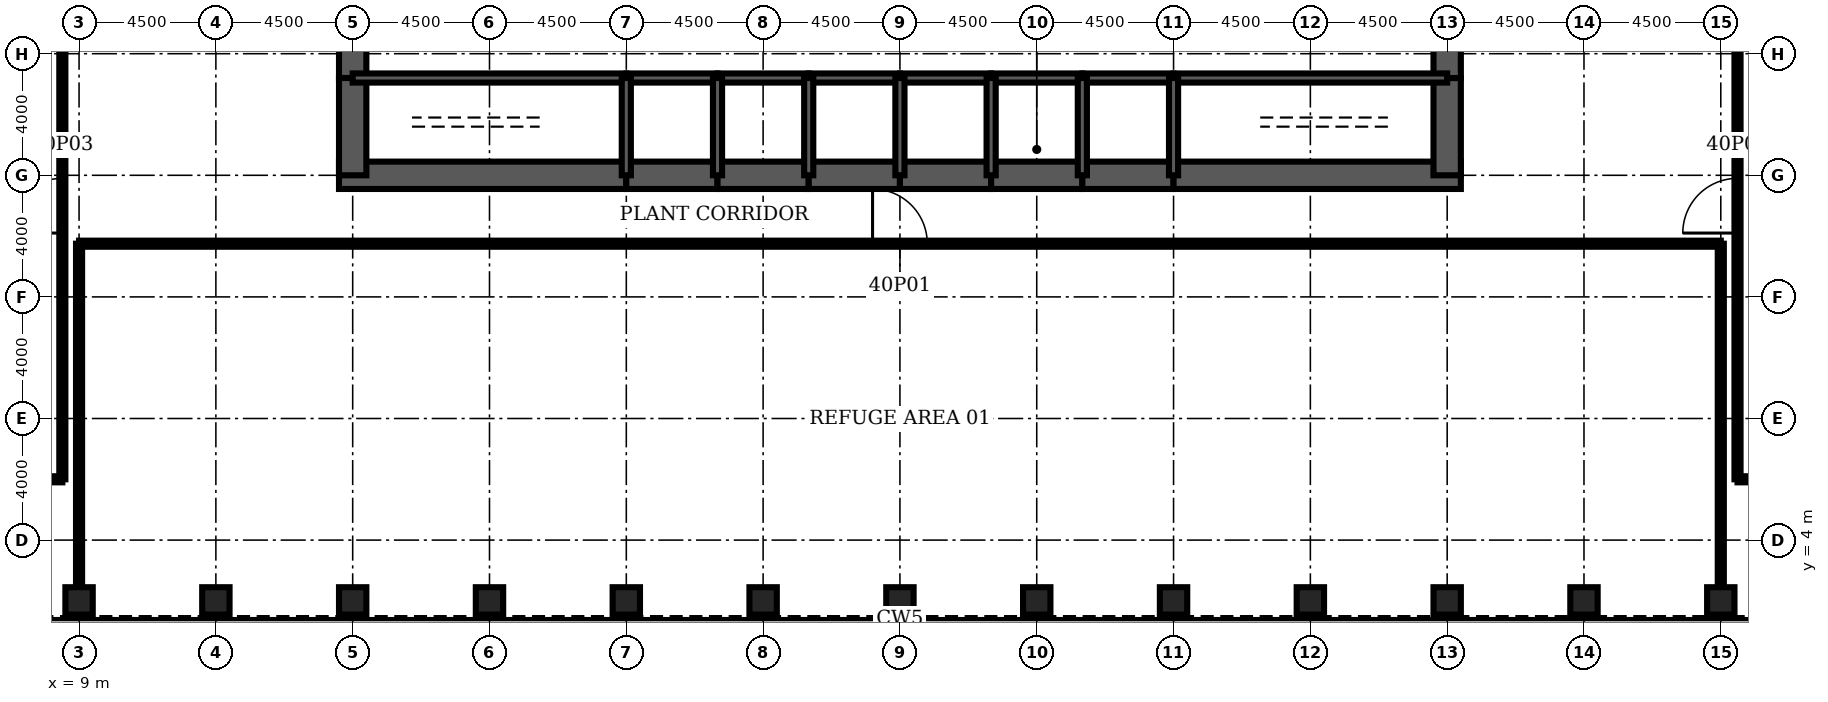
"""IFC4 building model, lengths in metres.
Left out: names, types, materials, properties, quantities, classifications, styles, units other than length and angle.
Written with IfcOpenShell. Run it as: python <this file> out.ifc"""

import sys

from ifc_helpers import new_model, si_unit, direction, frame, frame_2d, origin, origin_2d, place, context, subcontext, project, spatial, rectangle, hollow_rectangle, extrude, element, fill, save


model = new_model("IFC4")
c1 = context("Model", 3, precision=1e-05, world=origin(), true_north=direction((0.0, 1.0)))
c2 = subcontext(c1, "Body", "Model", "MODEL_VIEW")
j1 = project(units=[si_unit("LENGTHUNIT", "METRE"), si_unit("PLANEANGLEUNIT", "RADIAN")], contexts=[c1])
p1 = place(None, origin())
s1 = spatial("IfcSite", under=j1, at=p1, CompositionType="ELEMENT")
p2 = place(p1, origin())
s2 = spatial("IfcBuilding", under=s1, at=p2, CompositionType="ELEMENT")
p3 = place(p2, frame((0.0, 0.0, 180.3)))
s3 = spatial("IfcBuildingStorey", under=s2, at=p3, CompositionType="ELEMENT", Elevation=180.3)
for number, where, z_axis, x_axis in (
    (1, (9.0, 2.0, 0.0), (0.0, 0.0, 1.0), (0.0, 1.0, 0.0)),
    (2, (13.5, 2.0, 0.0), (0.0, 0.0, 1.0), (0.0, 1.0, 0.0)),
    (3, (18.0, 2.0, 0.0), (0.0, 0.0, 1.0), (0.0, 1.0, 0.0)),
    (4, (22.5, 2.0, 0.0), (0.0, 0.0, 1.0), (0.0, 1.0, 0.0)),
    (5, (27.0, 2.0, 0.0), (0.0, 0.0, 1.0), (0.0, 1.0, 0.0)),
    (6, (31.5, 2.0, 0.0), (0.0, 0.0, 1.0), (0.0, 1.0, 0.0)),
    (7, (36.0, 2.0, 0.0), (0.0, 0.0, 1.0), (0.0, 1.0, 0.0)),
    (8, (40.5, 2.0, 0.0), (0.0, 0.0, 1.0), (0.0, 1.0, 0.0)),
    (9, (45.0, 2.0, 0.0), (0.0, 0.0, 1.0), (0.0, 1.0, 0.0)),
    (10, (49.5, 2.0, 0.0), (0.0, 0.0, 1.0), (0.0, 1.0, 0.0)),
    (11, (54.0, 2.0, 0.0), (0.0, 0.0, 1.0), (0.0, 1.0, 0.0)),
    (12, (58.5, 2.0, 0.0), (0.0, 0.0, 1.0), (0.0, 1.0, 0.0)),
    (13, (63.0, 2.0, 0.0), (0.0, 0.0, 1.0), (0.0, 1.0, 0.0)),
):
    element("IfcColumn", number, at=place(p3, frame(where, z_axis=z_axis, x_axis=x_axis)), inside=s3, PredefinedType="COLUMN", context=c2, shape_type="SweptSolid", body=[
        extrude(hollow_rectangle(XDim=0.9, YDim=0.9, WallThickness=0.09, at=origin_2d()), origin(), (0.0, 0.0, 1.0), 5.5),
    ])
p4 = place(p3, frame((17.55, 16.0, 0.0), z_axis=(0.0, 0.0, 1.0), x_axis=(1.0, 0.0, 0.0)))
e14 = element("IfcWall", 14, at=p4, inside=s3, PredefinedType="SHEAR", context=c2, shape_type="SweptSolid", body=[
    extrude(rectangle(XDim=9.45, YDim=0.9, at=frame_2d((4.725, 0.0))), origin(), (0.0, 0.0, 1.0), 5.5),
])
for number, where, z_axis, x_axis in (
    (15, (27.0, 16.0, 0.0), (0.0, 0.0, 1.0), (1.0, 0.0, 0.0)),
    (16, (30.0, 16.0, 0.0), (0.0, 0.0, 1.0), (1.0, 0.0, 0.0)),
    (17, (33.0, 16.0, 0.0), (0.0, 0.0, 1.0), (1.0, 0.0, 0.0)),
    (18, (36.0, 16.0, 0.0), (0.0, 0.0, 1.0), (1.0, 0.0, 0.0)),
    (19, (39.0, 16.0, 0.0), (0.0, 0.0, 1.0), (1.0, 0.0, 0.0)),
    (20, (42.0, 16.0, 0.0), (0.0, 0.0, 1.0), (1.0, 0.0, 0.0)),
):
    element("IfcWall", number, at=place(p3, frame(where, z_axis=z_axis, x_axis=x_axis)), inside=s3, PredefinedType="SHEAR", context=c2, shape_type="SweptSolid", body=[
        extrude(rectangle(XDim=3.0, YDim=0.9, at=frame_2d((1.5, 0.0))), origin(), (0.0, 0.0, 1.0), 5.5),
    ])
p5 = place(p3, frame((45.0, 16.0, 0.0), z_axis=(0.0, 0.0, 1.0), x_axis=(1.0, 0.0, 0.0)))
e21 = element("IfcWall", 21, at=p5, inside=s3, PredefinedType="SHEAR", context=c2, shape_type="SweptSolid", body=[
    extrude(rectangle(XDim=9.45, YDim=0.9, at=frame_2d((4.725, 0.0))), origin(), (0.0, 0.0, 1.0), 5.5),
])
p6 = place(p3, frame((18.0, 22.0, 0.0), z_axis=(0.0, 0.0, 1.0), x_axis=(0.0, -1.0, 0.0)))
e22 = element("IfcWall", 22, at=p6, inside=s3, PredefinedType="SHEAR", context=c2, shape_type="SweptSolid", body=[
    extrude(rectangle(XDim=2.8, YDim=0.9, at=frame_2d((1.4, 0.0))), origin(), (0.0, 0.0, 1.0), 5.5),
])
p7 = place(p6, frame((0.6, 0.0, 0.0)))
e23 = element("IfcOpeningElement", 23, at=p7, cuts=e22, PredefinedType="OPENING", context=c2, shape_type="SweptSolid", body=[
    extrude(rectangle(XDim=1.8, YDim=2.1, at=frame_2d((0.9, 1.05))), frame((0.0, 0.46, 0.0), z_axis=(0.0, -1.0, 0.0), x_axis=(1.0, 0.0, 0.0)), (0.0, 0.0, 1.0), 0.92),
])
for number, where, z_axis, x_axis in (
    (24, (18.0, 19.2, 0.0), (0.0, 0.0, 1.0), (0.0, -1.0, 0.0)),
    (25, (54.0, 16.0, 0.0), (0.0, 0.0, 1.0), (0.0, 1.0, 0.0)),
):
    element("IfcWall", number, at=place(p3, frame(where, z_axis=z_axis, x_axis=x_axis)), inside=s3, PredefinedType="SHEAR", context=c2, shape_type="SweptSolid", body=[
        extrude(rectangle(XDim=3.2, YDim=0.9, at=frame_2d((1.6, 0.0))), origin(), (0.0, 0.0, 1.0), 5.5),
    ])
p8 = place(p3, frame((54.0, 19.2, 0.0), z_axis=(0.0, 0.0, 1.0), x_axis=(0.0, 1.0, 0.0)))
e26 = element("IfcWall", 26, at=p8, inside=s3, PredefinedType="SHEAR", context=c2, shape_type="SweptSolid", body=[
    extrude(rectangle(XDim=2.8, YDim=0.9, at=frame_2d((1.4, 0.0))), origin(), (0.0, 0.0, 1.0), 5.5),
])
p9 = place(p8, frame((0.4, 0.0, 0.0)))
e27 = element("IfcOpeningElement", 27, at=p9, cuts=e26, PredefinedType="OPENING", context=c2, shape_type="SweptSolid", body=[
    extrude(rectangle(XDim=1.8, YDim=2.1, at=frame_2d((0.9, 1.05))), frame((0.0, 0.46, 0.0), z_axis=(0.0, -1.0, 0.0), x_axis=(1.0, 0.0, 0.0)), (0.0, 0.0, 1.0), 0.92),
])
p10 = place(p3, frame((18.0, 19.2, 0.0), z_axis=(0.0, 0.0, 1.0), x_axis=(1.0, 0.0, 0.0)))
e28 = element("IfcWall", 28, at=p10, inside=s3, PredefinedType="SOLIDWALL", context=c2, shape_type="SweptSolid", body=[
    extrude(rectangle(XDim=9.0, YDim=0.3, at=frame_2d((4.5, 0.0))), origin(), (0.0, 0.0, 1.0), 5.5),
])
p11 = place(p10, frame((0.65, 0.0, 0.0)))
e29 = element("IfcOpeningElement", 29, at=p11, cuts=e28, PredefinedType="OPENING", context=c2, shape_type="SweptSolid", body=[
    extrude(rectangle(XDim=1.0, YDim=2.1, at=frame_2d((0.5, 1.05))), frame((0.0, 0.16, 0.0), z_axis=(0.0, -1.0, 0.0), x_axis=(1.0, 0.0, 0.0)), (0.0, 0.0, 1.0), 0.32),
])
p12 = place(p3, frame((27.0, 19.2, 0.0), z_axis=(0.0, 0.0, 1.0), x_axis=(1.0, 0.0, 0.0)))
e30 = element("IfcWall", 30, at=p12, inside=s3, PredefinedType="SOLIDWALL", context=c2, shape_type="SweptSolid", body=[
    extrude(rectangle(XDim=3.0, YDim=0.3, at=frame_2d((1.5, 0.0))), origin(), (0.0, 0.0, 1.0), 5.5),
])
p13 = place(p12, frame((0.95, 0.0, 0.0)))
e31 = element("IfcOpeningElement", 31, at=p13, cuts=e30, PredefinedType="OPENING", context=c2, shape_type="SweptSolid", body=[
    extrude(rectangle(XDim=1.1, YDim=2.2, at=frame_2d((0.55, 1.1))), frame((0.0, 0.16, 0.0), z_axis=(0.0, -1.0, 0.0), x_axis=(1.0, 0.0, 0.0)), (0.0, 0.0, 1.0), 0.32),
])
for number, where, z_axis, x_axis in (
    (32, (30.0, 19.2, 0.0), (0.0, 0.0, 1.0), (1.0, 0.0, 0.0)),
    (33, (33.0, 19.2, 0.0), (0.0, 0.0, 1.0), (1.0, 0.0, 0.0)),
    (34, (36.0, 19.2, 0.0), (0.0, 0.0, 1.0), (1.0, 0.0, 0.0)),
):
    element("IfcWall", number, at=place(p3, frame(where, z_axis=z_axis, x_axis=x_axis)), inside=s3, PredefinedType="SOLIDWALL", context=c2, shape_type="SweptSolid", body=[
        extrude(rectangle(XDim=3.0, YDim=0.3, at=frame_2d((1.5, 0.0))), origin(), (0.0, 0.0, 1.0), 5.5),
    ])
p14 = place(p3, frame((39.0, 19.2, 0.0), z_axis=(0.0, 0.0, 1.0), x_axis=(1.0, 0.0, 0.0)))
e35 = element("IfcWall", 35, at=p14, inside=s3, PredefinedType="SOLIDWALL", context=c2, shape_type="SweptSolid", body=[
    extrude(rectangle(XDim=3.0, YDim=0.3, at=frame_2d((1.5, 0.0))), origin(), (0.0, 0.0, 1.0), 5.5),
])
p15 = place(p14, frame((1.0, 0.0, 0.0)))
e36 = element("IfcOpeningElement", 36, at=p15, cuts=e35, PredefinedType="OPENING", context=c2, shape_type="SweptSolid", body=[
    extrude(rectangle(XDim=1.0, YDim=2.1, at=frame_2d((0.5, 1.05))), frame((0.0, 0.16, 0.0), z_axis=(0.0, -1.0, 0.0), x_axis=(1.0, 0.0, 0.0)), (0.0, 0.0, 1.0), 0.32),
])
p16 = place(p3, frame((42.0, 19.2, 0.0), z_axis=(0.0, 0.0, 1.0), x_axis=(1.0, 0.0, 0.0)))
e37 = element("IfcWall", 37, at=p16, inside=s3, PredefinedType="SOLIDWALL", context=c2, shape_type="SweptSolid", body=[
    extrude(rectangle(XDim=3.0, YDim=0.3, at=frame_2d((1.5, 0.0))), origin(), (0.0, 0.0, 1.0), 5.5),
])
p17 = place(p3, frame((45.0, 19.2, 0.0), z_axis=(0.0, 0.0, 1.0), x_axis=(1.0, 0.0, 0.0)))
e38 = element("IfcWall", 38, at=p17, inside=s3, PredefinedType="SOLIDWALL", context=c2, shape_type="SweptSolid", body=[
    extrude(rectangle(XDim=9.0, YDim=0.3, at=frame_2d((4.5, 0.0))), origin(), (0.0, 0.0, 1.0), 5.5),
])
p18 = place(p17, frame((7.35, 0.0, 0.0)))
e39 = element("IfcOpeningElement", 39, at=p18, cuts=e38, PredefinedType="OPENING", context=c2, shape_type="SweptSolid", body=[
    extrude(rectangle(XDim=1.0, YDim=2.1, at=frame_2d((0.5, 1.05))), frame((0.0, 0.16, 0.0), z_axis=(0.0, -1.0, 0.0), x_axis=(1.0, 0.0, 0.0)), (0.0, 0.0, 1.0), 0.32),
])
for number, where, z_axis, x_axis in (
    (40, (27.0, 16.0, 0.0), (0.0, 0.0, 1.0), (0.0, 1.0, 0.0)),
    (41, (30.0, 16.0, 0.0), (0.0, 0.0, 1.0), (0.0, 1.0, 0.0)),
    (42, (33.0, 16.0, 0.0), (0.0, 0.0, 1.0), (0.0, 1.0, 0.0)),
    (43, (36.0, 16.0, 0.0), (0.0, 0.0, 1.0), (0.0, 1.0, 0.0)),
    (44, (39.0, 16.0, 0.0), (0.0, 0.0, 1.0), (0.0, 1.0, 0.0)),
    (45, (42.0, 16.0, 0.0), (0.0, 0.0, 1.0), (0.0, 1.0, 0.0)),
    (46, (45.0, 16.0, 0.0), (0.0, 0.0, 1.0), (0.0, 1.0, 0.0)),
):
    element("IfcWall", number, at=place(p3, frame(where, z_axis=z_axis, x_axis=x_axis)), inside=s3, PredefinedType="SOLIDWALL", context=c2, shape_type="SweptSolid", body=[
        extrude(rectangle(XDim=3.2, YDim=0.3, at=frame_2d((1.6, 0.0))), origin(), (0.0, 0.0, 1.0), 5.5),
    ])
p19 = place(p3, frame((39.15, 17.4, 0.0), z_axis=(0.0, 0.0, 1.0), x_axis=(1.0, 0.0, 0.0)))
e47 = element("IfcWall", 47, at=p19, inside=s3, PredefinedType="SOLIDWALL", context=c2, shape_type="SweptSolid", body=[
    extrude(rectangle(XDim=2.7, YDim=0.3, at=frame_2d((1.35, 0.0))), origin(), (0.0, 0.0, 1.0), 5.34),
])
p20 = place(p19, frame((0.85, 0.0, 0.0)))
e48 = element("IfcOpeningElement", 48, at=p20, cuts=e47, PredefinedType="OPENING", context=c2, shape_type="SweptSolid", body=[
    extrude(rectangle(XDim=1.0, YDim=2.1, at=frame_2d((0.5, 1.05))), frame((0.0, 0.16, 0.0), z_axis=(0.0, -1.0, 0.0), x_axis=(1.0, 0.0, 0.0)), (0.0, 0.0, 1.0), 0.32),
])
for number, where, z_axis, x_axis in (
    (49, (2.7, 6.0, 0.0), (0.0, 0.0, 1.0), (1.0, 0.0, 0.0)),
    (50, (63.55, 6.0, 0.0), (0.0, 0.0, 1.0), (1.0, 0.0, 0.0)),
):
    element("IfcWall", number, at=place(p3, frame(where, z_axis=z_axis, x_axis=x_axis)), inside=s3, PredefinedType="PARTITIONING", context=c2, shape_type="SweptSolid", body=[
        extrude(rectangle(XDim=5.75, YDim=0.2, at=frame_2d((2.875, 0.0))), origin(), (0.0, 0.0, 1.0), 5.34),
    ])
p21 = place(p3, frame((9.0, 13.75, 0.0), z_axis=(0.0, 0.0, 1.0), x_axis=(1.0, 0.0, 0.0)))
e51 = element("IfcWall", 51, at=p21, inside=s3, PredefinedType="PARTITIONING", context=c2, shape_type="SweptSolid", body=[
    extrude(rectangle(XDim=54.0, YDim=0.2, at=frame_2d((27.0, 0.0))), origin(), (0.0, 0.0, 1.0), 5.34),
])
p22 = place(p21, frame((26.1, 0.0, 0.0)))
e52 = element("IfcOpeningElement", 52, at=p22, cuts=e51, PredefinedType="OPENING", context=c2, shape_type="SweptSolid", body=[
    extrude(rectangle(XDim=1.8, YDim=2.1, at=frame_2d((0.9, 1.05))), frame((0.0, 0.11, 0.0), z_axis=(0.0, -1.0, 0.0), x_axis=(1.0, 0.0, 0.0)), (0.0, 0.0, 1.0), 0.22),
])
p23 = place(p3, frame((8.45, 6.0, 0.0), z_axis=(0.0, 0.0, 1.0), x_axis=(0.0, 1.0, 0.0)))
e53 = element("IfcWall", 53, at=p23, inside=s3, PredefinedType="PARTITIONING", context=c2, shape_type="SweptSolid", body=[
    extrude(rectangle(XDim=36.0, YDim=0.2, at=frame_2d((18.0, 0.0))), origin(), (0.0, 0.0, 1.0), 5.34),
])
p24 = place(p23, frame((8.1, 0.0, 0.0)))
e54 = element("IfcOpeningElement", 54, at=p24, cuts=e53, PredefinedType="OPENING", context=c2, shape_type="SweptSolid", body=[
    extrude(rectangle(XDim=1.8, YDim=2.1, at=frame_2d((0.9, 1.05))), frame((0.0, 0.11, 0.0), z_axis=(0.0, -1.0, 0.0), x_axis=(1.0, 0.0, 0.0)), (0.0, 0.0, 1.0), 0.22),
])
p25 = place(p23, frame((23.1, 0.0, 0.0)))
e55 = element("IfcOpeningElement", 55, at=p25, cuts=e53, PredefinedType="OPENING", context=c2, shape_type="SweptSolid", body=[
    extrude(rectangle(XDim=1.8, YDim=2.1, at=frame_2d((0.9, 1.05))), frame((0.0, 0.11, 0.0), z_axis=(0.0, -1.0, 0.0), x_axis=(1.0, 0.0, 0.0)), (0.0, 0.0, 1.0), 0.22),
])
p26 = place(p23, frame((32.5, 0.0, 0.0)))
e56 = element("IfcOpeningElement", 56, at=p26, cuts=e53, PredefinedType="OPENING", context=c2, shape_type="SweptSolid", body=[
    extrude(rectangle(XDim=1.0, YDim=2.1, at=frame_2d((0.5, 1.05))), frame((0.0, 0.11, 0.0), z_axis=(0.0, -1.0, 0.0), x_axis=(1.0, 0.0, 0.0)), (0.0, 0.0, 1.0), 0.22),
])
for number, where, z_axis, x_axis in (
    (57, (9.0, 2.45, 0.0), (0.0, 0.0, 1.0), (0.0, 1.0, 0.0)),
    (58, (63.0, 2.45, 0.0), (0.0, 0.0, 1.0), (0.0, 1.0, 0.0)),
):
    element("IfcWall", number, at=place(p3, frame(where, z_axis=z_axis, x_axis=x_axis)), inside=s3, PredefinedType="PARTITIONING", context=c2, shape_type="SweptSolid", body=[
        extrude(rectangle(XDim=11.3, YDim=0.2, at=frame_2d((5.65, 0.0))), origin(), (0.0, 0.0, 1.0), 5.34),
    ])
p27 = place(p3, frame((63.55, 6.0, 0.0), z_axis=(0.0, 0.0, 1.0), x_axis=(0.0, 1.0, 0.0)))
e59 = element("IfcWall", 59, at=p27, inside=s3, PredefinedType="PARTITIONING", context=c2, shape_type="SweptSolid", body=[
    extrude(rectangle(XDim=36.0, YDim=0.2, at=frame_2d((18.0, 0.0))), origin(), (0.0, 0.0, 1.0), 5.34),
])
p28 = place(p27, frame((8.1, 0.0, 0.0)))
e60 = element("IfcOpeningElement", 60, at=p28, cuts=e59, PredefinedType="OPENING", context=c2, shape_type="SweptSolid", body=[
    extrude(rectangle(XDim=1.8, YDim=2.1, at=frame_2d((0.9, 1.05))), frame((0.0, 0.11, 0.0), z_axis=(0.0, -1.0, 0.0), x_axis=(1.0, 0.0, 0.0)), (0.0, 0.0, 1.0), 0.22),
])
p29 = place(p27, frame((19.5, 0.0, 0.0)))
e61 = element("IfcOpeningElement", 61, at=p29, cuts=e59, PredefinedType="OPENING", context=c2, shape_type="SweptSolid", body=[
    extrude(rectangle(XDim=1.0, YDim=2.1, at=frame_2d((0.5, 1.05))), frame((0.0, 0.11, 0.0), z_axis=(0.0, -1.0, 0.0), x_axis=(1.0, 0.0, 0.0)), (0.0, 0.0, 1.0), 0.22),
])
p30 = place(p27, frame((25.1, 0.0, 0.0)))
e62 = element("IfcOpeningElement", 62, at=p30, cuts=e59, PredefinedType="OPENING", context=c2, shape_type="SweptSolid", body=[
    extrude(rectangle(XDim=1.8, YDim=2.1, at=frame_2d((0.9, 1.05))), frame((0.0, 0.11, 0.0), z_axis=(0.0, -1.0, 0.0), x_axis=(1.0, 0.0, 0.0)), (0.0, 0.0, 1.0), 0.22),
])
p31 = place(p27, frame((32.5, 0.0, 0.0)))
e63 = element("IfcOpeningElement", 63, at=p31, cuts=e59, PredefinedType="OPENING", context=c2, shape_type="SweptSolid", body=[
    extrude(rectangle(XDim=1.0, YDim=2.1, at=frame_2d((0.5, 1.05))), frame((0.0, 0.11, 0.0), z_axis=(0.0, -1.0, 0.0), x_axis=(1.0, 0.0, 0.0)), (0.0, 0.0, 1.0), 0.22),
])
p32 = place(p20, origin())
e64 = element("IfcDoor", 64, at=p32, inside=s3, OperationType="SINGLE_SWING_LEFT", PredefinedType="DOOR", context=c2, shape_type="SweptSolid", body=[
    extrude(rectangle(XDim=1.0, YDim=2.1, at=frame_2d((0.5, 1.05))), frame((0.0, 0.025, 0.0), z_axis=(0.0, -1.0, 0.0), x_axis=(1.0, 0.0, 0.0)), (0.0, 0.0, 1.0), 0.05),
])
fill(e48, e64)
p33 = place(p22, origin())
e65 = element("IfcDoor", 65, at=p33, inside=s3, OperationType="SINGLE_SWING_LEFT", PredefinedType="DOOR", context=c2, shape_type="SweptSolid", body=[
    extrude(rectangle(XDim=1.8, YDim=2.1, at=frame_2d((0.9, 1.05))), frame((0.0, 0.025, 0.0), z_axis=(0.0, -1.0, 0.0), x_axis=(1.0, 0.0, 0.0)), (0.0, 0.0, 1.0), 0.05),
])
fill(e52, e65)
p34 = place(p28, origin())
e66 = element("IfcDoor", 66, at=p34, inside=s3, OperationType="SINGLE_SWING_LEFT", PredefinedType="DOOR", context=c2, shape_type="SweptSolid", body=[
    extrude(rectangle(XDim=1.8, YDim=2.1, at=frame_2d((0.9, 1.05))), frame((0.0, 0.025, 0.0), z_axis=(0.0, -1.0, 0.0), x_axis=(1.0, 0.0, 0.0)), (0.0, 0.0, 1.0), 0.05),
])
fill(e60, e66)
p35 = place(p24, origin())
e67 = element("IfcDoor", 67, at=p35, inside=s3, OperationType="SINGLE_SWING_LEFT", PredefinedType="DOOR", context=c2, shape_type="SweptSolid", body=[
    extrude(rectangle(XDim=1.8, YDim=2.1, at=frame_2d((0.9, 1.05))), frame((0.0, 0.025, 0.0), z_axis=(0.0, -1.0, 0.0), x_axis=(1.0, 0.0, 0.0)), (0.0, 0.0, 1.0), 0.05),
])
fill(e54, e67)
p36 = place(p13, origin())
e68 = element("IfcDoor", 68, at=p36, inside=s3, OperationType="DOUBLE_DOOR_SLIDING", PredefinedType="USERDEFINED", context=c2, shape_type="SweptSolid", body=[
    extrude(rectangle(XDim=1.1, YDim=2.2, at=frame_2d((0.55, 1.1))), frame((0.0, 0.025, 0.0), z_axis=(0.0, -1.0, 0.0), x_axis=(1.0, 0.0, 0.0)), (0.0, 0.0, 1.0), 0.05),
])
fill(e31, e68)
p37 = place(p11, origin())
e69 = element("IfcDoor", 69, at=p37, inside=s3, OperationType="SINGLE_SWING_LEFT", PredefinedType="DOOR", context=c2, shape_type="SweptSolid", body=[
    extrude(rectangle(XDim=1.0, YDim=2.1, at=frame_2d((0.5, 1.05))), frame((0.0, 0.025, 0.0), z_axis=(0.0, -1.0, 0.0), x_axis=(1.0, 0.0, 0.0)), (0.0, 0.0, 1.0), 0.05),
])
fill(e29, e69)
p38 = place(p18, origin())
e70 = element("IfcDoor", 70, at=p38, inside=s3, OperationType="SINGLE_SWING_RIGHT", PredefinedType="DOOR", context=c2, shape_type="SweptSolid", body=[
    extrude(rectangle(XDim=1.0, YDim=2.1, at=frame_2d((0.5, 1.05))), frame((0.0, 0.025, 0.0), z_axis=(0.0, -1.0, 0.0), x_axis=(1.0, 0.0, 0.0)), (0.0, 0.0, 1.0), 0.05),
])
fill(e39, e70)
p39 = place(p7, origin())
e71 = element("IfcDoor", 71, at=p39, inside=s3, OperationType="SINGLE_SWING_LEFT", PredefinedType="DOOR", context=c2, shape_type="SweptSolid", body=[
    extrude(rectangle(XDim=1.8, YDim=2.1, at=frame_2d((0.9, 1.05))), frame((0.0, 0.45, 0.0), z_axis=(0.0, -1.0, 0.0), x_axis=(1.0, 0.0, 0.0)), (0.0, 0.0, 1.0), 0.899),
])
fill(e23, e71)
p40 = place(p9, origin())
e72 = element("IfcDoor", 72, at=p40, inside=s3, OperationType="SINGLE_SWING_LEFT", PredefinedType="DOOR", context=c2, shape_type="SweptSolid", body=[
    extrude(rectangle(XDim=1.8, YDim=2.1, at=frame_2d((0.9, 1.05))), frame((0.0, 0.45, 0.0), z_axis=(0.0, -1.0, 0.0), x_axis=(1.0, 0.0, 0.0)), (0.0, 0.0, 1.0), 0.899),
])
fill(e27, e72)
p41 = place(p15, origin())
e73 = element("IfcDoor", 73, at=p41, inside=s3, OperationType="SINGLE_SWING_LEFT", PredefinedType="DOOR", context=c2, shape_type="SweptSolid", body=[
    extrude(rectangle(XDim=1.0, YDim=2.1, at=frame_2d((0.5, 1.05))), frame((0.0, 0.025, 0.0), z_axis=(0.0, -1.0, 0.0), x_axis=(1.0, 0.0, 0.0)), (0.0, 0.0, 1.0), 0.05),
])
fill(e36, e73)
save(model, sys.argv[1])
